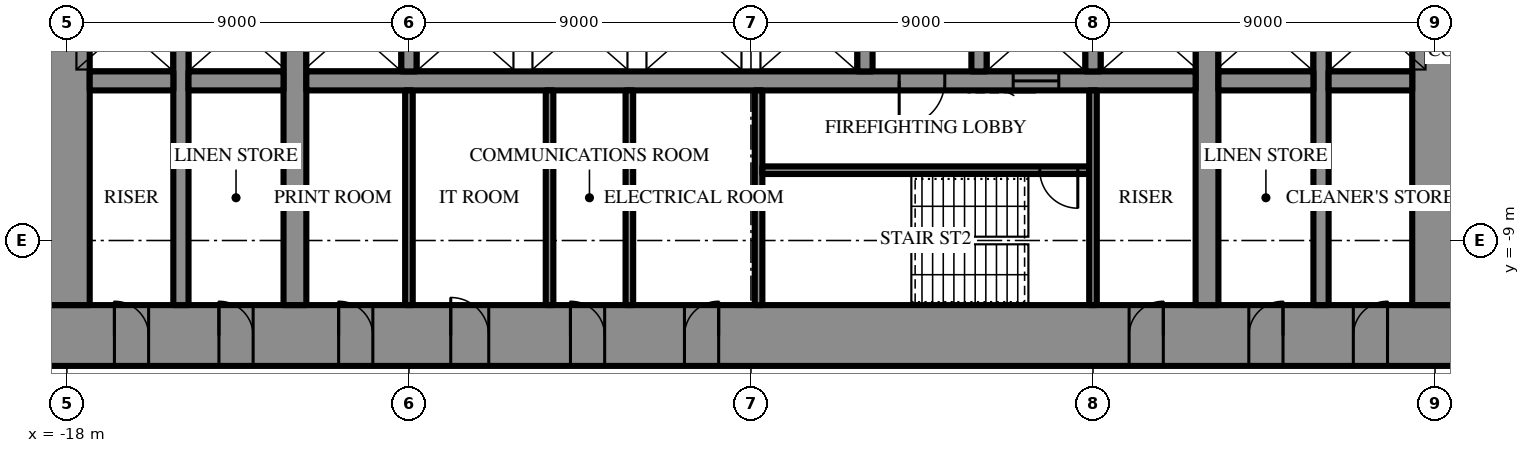
"""IFC4 building model, lengths in metres.
Left out: names, types, materials, properties, quantities, classifications, styles, units other than length and angle.
Written with IfcOpenShell. Run it as: python <this file> out.ifc"""

import sys

from ifc_helpers import new_model, si_unit, direction, frame, frame_2d, origin, place, context, subcontext, project, spatial, rectangle, extrude, element, fill, save


model = new_model("IFC4")
c1 = context("Model", 3, precision=1e-05, world=origin(), true_north=direction((0.0, 1.0)))
c2 = subcontext(c1, "Body", "Model", "MODEL_VIEW")
j1 = project(units=[si_unit("LENGTHUNIT", "METRE"), si_unit("PLANEANGLEUNIT", "RADIAN")], contexts=[c1])
p1 = place(None, origin())
s1 = spatial("IfcSite", under=j1, at=p1, CompositionType="ELEMENT")
p2 = place(p1, origin())
s2 = spatial("IfcBuilding", under=s1, at=p2, CompositionType="ELEMENT")
p3 = place(p2, frame((0.0, 0.0, 90.7)))
s3 = spatial("IfcBuildingStorey", under=s2, at=p3, CompositionType="ELEMENT", Elevation=90.7)
p4 = place(p3, frame((18.6, -11.5, 0.0), z_axis=(0.0, 0.0, 1.0), x_axis=(-1.0, 0.0, 0.0)))
e1 = element("IfcWall", 1, at=p4, inside=s3, PredefinedType="SHEAR", context=c2, shape_type="SweptSolid", body=[
    extrude(rectangle(XDim=37.2, YDim=1.6, at=frame_2d((18.6, 0.0))), origin(), (0.0, 0.0, 1.0), 4.2),
])
p5 = place(p4, frame((19.45, 0.0, 0.0)))
e2 = element("IfcOpeningElement", 2, at=p5, cuts=e1, PredefinedType="OPENING", context=c2, shape_type="SweptSolid", body=[
    extrude(rectangle(XDim=0.9, YDim=2.2, at=frame_2d((0.45, 1.1))), frame((0.0, 0.81, 0.0), z_axis=(0.0, -1.0, 0.0), x_axis=(1.0, 0.0, 0.0)), (0.0, 0.0, 1.0), 1.62),
])
p6 = place(p4, frame((22.45, 0.0, 0.0)))
e3 = element("IfcOpeningElement", 3, at=p6, cuts=e1, PredefinedType="OPENING", context=c2, shape_type="SweptSolid", body=[
    extrude(rectangle(XDim=0.9, YDim=2.2, at=frame_2d((0.45, 1.1))), frame((0.0, 0.81, 0.0), z_axis=(0.0, -1.0, 0.0), x_axis=(1.0, 0.0, 0.0)), (0.0, 0.0, 1.0), 1.62),
])
p7 = place(p4, frame((25.5, 0.0, 0.0)))
e4 = element("IfcOpeningElement", 4, at=p7, cuts=e1, PredefinedType="OPENING", context=c2, shape_type="SweptSolid", body=[
    extrude(rectangle(XDim=1.0, YDim=2.2, at=frame_2d((0.5, 1.1))), frame((0.0, 0.81, 0.0), z_axis=(0.0, -1.0, 0.0), x_axis=(1.0, 0.0, 0.0)), (0.0, 0.0, 1.0), 1.62),
])
p8 = place(p4, frame((1.85, 0.0, 0.0)))
e5 = element("IfcOpeningElement", 5, at=p8, cuts=e1, PredefinedType="OPENING", context=c2, shape_type="SweptSolid", body=[
    extrude(rectangle(XDim=0.9, YDim=2.2, at=frame_2d((0.45, 1.1))), frame((0.0, 0.81, 0.0), z_axis=(0.0, -1.0, 0.0), x_axis=(1.0, 0.0, 0.0)), (0.0, 0.0, 1.0), 1.62),
])
p9 = place(p4, frame((4.6, 0.0, 0.0)))
e6 = element("IfcOpeningElement", 6, at=p9, cuts=e1, PredefinedType="OPENING", context=c2, shape_type="SweptSolid", body=[
    extrude(rectangle(XDim=0.9, YDim=2.2, at=frame_2d((0.45, 1.1))), frame((0.0, 0.81, 0.0), z_axis=(0.0, -1.0, 0.0), x_axis=(1.0, 0.0, 0.0)), (0.0, 0.0, 1.0), 1.62),
])
p10 = place(p4, frame((7.75, 0.0, 0.0)))
e7 = element("IfcOpeningElement", 7, at=p10, cuts=e1, PredefinedType="OPENING", context=c2, shape_type="SweptSolid", body=[
    extrude(rectangle(XDim=0.9, YDim=2.2, at=frame_2d((0.45, 1.1))), frame((0.0, 0.81, 0.0), z_axis=(0.0, -1.0, 0.0), x_axis=(1.0, 0.0, 0.0)), (0.0, 0.0, 1.0), 1.62),
])
p11 = place(p4, frame((28.55, 0.0, 0.0)))
e8 = element("IfcOpeningElement", 8, at=p11, cuts=e1, PredefinedType="OPENING", context=c2, shape_type="SweptSolid", body=[
    extrude(rectangle(XDim=0.9, YDim=2.2, at=frame_2d((0.45, 1.1))), frame((0.0, 0.81, 0.0), z_axis=(0.0, -1.0, 0.0), x_axis=(1.0, 0.0, 0.0)), (0.0, 0.0, 1.0), 1.62),
])
p12 = place(p4, frame((31.7, 0.0, 0.0)))
e9 = element("IfcOpeningElement", 9, at=p12, cuts=e1, PredefinedType="OPENING", context=c2, shape_type="SweptSolid", body=[
    extrude(rectangle(XDim=0.9, YDim=2.2, at=frame_2d((0.45, 1.1))), frame((0.0, 0.81, 0.0), z_axis=(0.0, -1.0, 0.0), x_axis=(1.0, 0.0, 0.0)), (0.0, 0.0, 1.0), 1.62),
])
p13 = place(p4, frame((34.45, 0.0, 0.0)))
e10 = element("IfcOpeningElement", 10, at=p13, cuts=e1, PredefinedType="OPENING", context=c2, shape_type="SweptSolid", body=[
    extrude(rectangle(XDim=0.9, YDim=2.2, at=frame_2d((0.45, 1.1))), frame((0.0, 0.81, 0.0), z_axis=(0.0, -1.0, 0.0), x_axis=(1.0, 0.0, 0.0)), (0.0, 0.0, 1.0), 1.62),
])
p14 = place(p3, frame((18.0, -10.7, 0.0), z_axis=(0.0, 0.0, 1.0), x_axis=(0.0, 1.0, 0.0)))
e11 = element("IfcWall", 11, at=p14, inside=s3, PredefinedType="SHEAR", context=c2, shape_type="SweptSolid", body=[
    extrude(rectangle(XDim=21.4, YDim=1.2, at=frame_2d((10.7, 0.0))), origin(), (0.0, 0.0, 1.0), 4.2),
])
p15 = place(p14, frame((9.8, 0.0, 0.0)))
e12 = element("IfcOpeningElement", 12, at=p15, cuts=e11, PredefinedType="OPENING", context=c2, shape_type="SweptSolid", body=[
    extrude(rectangle(XDim=1.8, YDim=2.4, at=frame_2d((0.9, 1.2))), frame((0.0, 0.61, 0.0), z_axis=(0.0, -1.0, 0.0), x_axis=(1.0, 0.0, 0.0)), (0.0, 0.0, 1.0), 1.22),
])
p16 = place(p3, frame((-18.0, 10.7, 0.0), z_axis=(0.0, 0.0, 1.0), x_axis=(0.0, -1.0, 0.0)))
e13 = element("IfcWall", 13, at=p16, inside=s3, PredefinedType="SHEAR", context=c2, shape_type="SweptSolid", body=[
    extrude(rectangle(XDim=21.4, YDim=1.2, at=frame_2d((10.7, 0.0))), origin(), (0.0, 0.0, 1.0), 4.2),
])
p17 = place(p16, frame((9.8, 0.0, 0.0)))
e14 = element("IfcOpeningElement", 14, at=p17, cuts=e13, PredefinedType="OPENING", context=c2, shape_type="SweptSolid", body=[
    extrude(rectangle(XDim=1.8, YDim=2.4, at=frame_2d((0.9, 1.2))), frame((0.0, 0.61, 0.0), z_axis=(0.0, -1.0, 0.0), x_axis=(1.0, 0.0, 0.0)), (0.0, 0.0, 1.0), 1.22),
])
p18 = place(p3, frame((12.0, -10.7, 0.0), z_axis=(0.0, 0.0, 1.0), x_axis=(0.0, 1.0, 0.0)))
e15 = element("IfcWall", 15, at=p18, inside=s3, PredefinedType="SHEAR", context=c2, shape_type="SweptSolid", body=[
    extrude(rectangle(XDim=21.4, YDim=0.6, at=frame_2d((10.7, 0.0))), origin(), (0.0, 0.0, 1.0), 4.2),
])
p19 = place(p18, frame((9.8, 0.0, 0.0)))
e16 = element("IfcOpeningElement", 16, at=p19, cuts=e15, PredefinedType="OPENING", context=c2, shape_type="SweptSolid", body=[
    extrude(rectangle(XDim=1.8, YDim=2.4, at=frame_2d((0.9, 1.2))), frame((0.0, 0.31, 0.0), z_axis=(0.0, -1.0, 0.0), x_axis=(1.0, 0.0, 0.0)), (0.0, 0.0, 1.0), 0.62),
])
p20 = place(p3, frame((-12.0, -10.7, 0.0), z_axis=(0.0, 0.0, 1.0), x_axis=(0.0, 1.0, 0.0)))
e17 = element("IfcWall", 17, at=p20, inside=s3, PredefinedType="SHEAR", context=c2, shape_type="SweptSolid", body=[
    extrude(rectangle(XDim=21.4, YDim=0.6, at=frame_2d((10.7, 0.0))), origin(), (0.0, 0.0, 1.0), 4.2),
])
p21 = place(p20, frame((9.8, 0.0, 0.0)))
e18 = element("IfcOpeningElement", 18, at=p21, cuts=e17, PredefinedType="OPENING", context=c2, shape_type="SweptSolid", body=[
    extrude(rectangle(XDim=1.8, YDim=2.4, at=frame_2d((0.9, 1.2))), frame((0.0, 0.31, 0.0), z_axis=(0.0, -1.0, 0.0), x_axis=(1.0, 0.0, 0.0)), (0.0, 0.0, 1.0), 0.62),
])
p22 = place(p3, frame((15.0, -10.7, 0.0), z_axis=(0.0, 0.0, 1.0), x_axis=(0.0, 1.0, 0.0)))
e19 = element("IfcWall", 19, at=p22, inside=s3, PredefinedType="SHEAR", context=c2, shape_type="SweptSolid", body=[
    extrude(rectangle(XDim=21.4, YDim=0.4, at=frame_2d((10.7, 0.0))), origin(), (0.0, 0.0, 1.0), 4.2),
])
p23 = place(p22, frame((9.8, 0.0, 0.0)))
e20 = element("IfcOpeningElement", 20, at=p23, cuts=e19, PredefinedType="OPENING", context=c2, shape_type="SweptSolid", body=[
    extrude(rectangle(XDim=1.8, YDim=2.4, at=frame_2d((0.9, 1.2))), frame((0.0, 0.21, 0.0), z_axis=(0.0, -1.0, 0.0), x_axis=(1.0, 0.0, 0.0)), (0.0, 0.0, 1.0), 0.42),
])
p24 = place(p3, frame((-15.0, -10.7, 0.0), z_axis=(0.0, 0.0, 1.0), x_axis=(0.0, 1.0, 0.0)))
e21 = element("IfcWall", 21, at=p24, inside=s3, PredefinedType="SHEAR", context=c2, shape_type="SweptSolid", body=[
    extrude(rectangle(XDim=21.4, YDim=0.4, at=frame_2d((10.7, 0.0))), origin(), (0.0, 0.0, 1.0), 4.2),
])
p25 = place(p24, frame((9.8, 0.0, 0.0)))
e22 = element("IfcOpeningElement", 22, at=p25, cuts=e21, PredefinedType="OPENING", context=c2, shape_type="SweptSolid", body=[
    extrude(rectangle(XDim=1.8, YDim=2.4, at=frame_2d((0.9, 1.2))), frame((0.0, 0.21, 0.0), z_axis=(0.0, -1.0, 0.0), x_axis=(1.0, 0.0, 0.0)), (0.0, 0.0, 1.0), 0.42),
])
p26 = place(p3, frame((17.4, -4.8, 0.0), z_axis=(0.0, 0.0, 1.0), x_axis=(-1.0, 0.0, 0.0)))
e23 = element("IfcWall", 23, at=p26, inside=s3, PredefinedType="SHEAR", context=c2, shape_type="SweptSolid", body=[
    extrude(rectangle(XDim=2.2, YDim=0.5, at=frame_2d((1.1, 0.0))), origin(), (0.0, 0.0, 1.0), 4.2),
])
p27 = place(p3, frame((14.8, -4.8, 0.0), z_axis=(0.0, 0.0, 1.0), x_axis=(-1.0, 0.0, 0.0)))
e24 = element("IfcWall", 24, at=p27, inside=s3, PredefinedType="SHEAR", context=c2, shape_type="SweptSolid", body=[
    extrude(rectangle(XDim=2.5, YDim=0.5, at=frame_2d((1.25, 0.0))), origin(), (0.0, 0.0, 1.0), 4.2),
])
p28 = place(p3, frame((11.7, -4.8, 0.0), z_axis=(0.0, 0.0, 1.0), x_axis=(-1.0, 0.0, 0.0)))
e25 = element("IfcWall", 25, at=p28, inside=s3, PredefinedType="SHEAR", context=c2, shape_type="SweptSolid", body=[
    extrude(rectangle(XDim=23.4, YDim=0.5, at=frame_2d((11.7, 0.0))), origin(), (0.0, 0.0, 1.0), 4.2),
])
p29 = place(p28, frame((6.6, 0.0, 0.0)))
e26 = element("IfcOpeningElement", 26, at=p29, cuts=e25, PredefinedType="OPENING", context=c2, shape_type="SweptSolid", body=[
    extrude(rectangle(XDim=1.2, YDim=2.2, at=frame_2d((0.6, 1.1))), frame((0.0, 0.26, 0.0), z_axis=(0.0, -1.0, 0.0), x_axis=(1.0, 0.0, 0.0)), (0.0, 0.0, 1.0), 0.52),
])
p30 = place(p28, frame((3.6, 0.0, 0.0)))
e27 = element("IfcOpeningElement", 27, at=p30, cuts=e25, PredefinedType="OPENING", context=c2, shape_type="SweptSolid", body=[
    extrude(rectangle(XDim=1.2, YDim=2.2, at=frame_2d((0.6, 1.1))), frame((0.0, 0.26, 0.0), z_axis=(0.0, -1.0, 0.0), x_axis=(1.0, 0.0, 0.0)), (0.0, 0.0, 1.0), 0.52),
])
p31 = place(p3, frame((-12.3, -4.8, 0.0), z_axis=(0.0, 0.0, 1.0), x_axis=(-1.0, 0.0, 0.0)))
e28 = element("IfcWall", 28, at=p31, inside=s3, PredefinedType="SHEAR", context=c2, shape_type="SweptSolid", body=[
    extrude(rectangle(XDim=2.5, YDim=0.5, at=frame_2d((1.25, 0.0))), origin(), (0.0, 0.0, 1.0), 4.2),
])
p32 = place(p3, frame((-15.2, -4.8, 0.0), z_axis=(0.0, 0.0, 1.0), x_axis=(-1.0, 0.0, 0.0)))
e29 = element("IfcWall", 29, at=p32, inside=s3, PredefinedType="SHEAR", context=c2, shape_type="SweptSolid", body=[
    extrude(rectangle(XDim=2.2, YDim=0.5, at=frame_2d((1.1, 0.0))), origin(), (0.0, 0.0, 1.0), 4.2),
])
for number, where, z_axis, x_axis in (
    (30, (9.0, -2.25, 0.0), (0.0, 0.0, 1.0), (0.0, -1.0, 0.0)),
    (31, (6.0, -2.25, 0.0), (0.0, 0.0, 1.0), (0.0, -1.0, 0.0)),
    (32, (3.0, -2.25, 0.0), (0.0, 0.0, 1.0), (0.0, -1.0, 0.0)),
    (33, (-9.0, -2.25, 0.0), (0.0, 0.0, 1.0), (0.0, -1.0, 0.0)),
):
    element("IfcWall", number, at=place(p3, frame(where, z_axis=z_axis, x_axis=x_axis)), inside=s3, PredefinedType="SHEAR", context=c2, shape_type="SweptSolid", body=[
        extrude(rectangle(XDim=2.3, YDim=0.4, at=frame_2d((1.15, 0.0))), origin(), (0.0, 0.0, 1.0), 4.2),
    ])
p33 = place(p3, frame((0.2, -5.05, 0.0), z_axis=(0.0, 0.0, 1.0), x_axis=(0.0, -1.0, 0.0)))
e34 = element("IfcWall", 34, at=p33, inside=s3, PredefinedType="SHEAR", context=c2, shape_type="SweptSolid", body=[
    extrude(rectangle(XDim=5.65, YDim=0.2, at=frame_2d((2.825, 0.0))), origin(), (0.0, 0.0, 1.0), 4.2),
])
p34 = place(p3, frame((8.9, -7.15, 0.0), z_axis=(0.0, 0.0, 1.0), x_axis=(-1.0, 0.0, 0.0)))
e35 = element("IfcWall", 35, at=p34, inside=s3, PredefinedType="SHEAR", context=c2, shape_type="SweptSolid", body=[
    extrude(rectangle(XDim=8.6, YDim=0.2, at=frame_2d((4.3, 0.0))), origin(), (0.0, 0.0, 1.0), 4.2),
])
p35 = place(p34, frame((0.3, 0.0, 0.0)))
e36 = element("IfcOpeningElement", 36, at=p35, cuts=e35, PredefinedType="OPENING", context=c2, shape_type="SweptSolid", body=[
    extrude(rectangle(XDim=1.0, YDim=2.2, at=frame_2d((0.5, 1.1))), frame((0.0, 0.11, 0.0), z_axis=(0.0, -1.0, 0.0), x_axis=(1.0, 0.0, 0.0)), (0.0, 0.0, 1.0), 0.22),
])
for number, where, z_axis, x_axis in (
    (37, (9.0, -5.05, 0.0), (0.0, 0.0, 1.0), (0.0, -1.0, 0.0)),
    (38, (-9.0, -5.05, 0.0), (0.0, 0.0, 1.0), (0.0, -1.0, 0.0)),
    (39, (-3.2, -5.05, 0.0), (0.0, 0.0, 1.0), (0.0, -1.0, 0.0)),
    (40, (-5.3, -5.05, 0.0), (0.0, 0.0, 1.0), (0.0, -1.0, 0.0)),
):
    element("IfcWall", number, at=place(p3, frame(where, z_axis=z_axis, x_axis=x_axis)), inside=s3, PredefinedType="PARTITIONING", context=c2, shape_type="SweptSolid", body=[
        extrude(rectangle(XDim=5.65, YDim=0.2, at=frame_2d((2.825, 0.0))), origin(), (0.0, 0.0, 1.0), 4.0),
    ])
p36 = place(p29, origin())
e41 = element("IfcDoor", 41, at=p36, inside=s3, OperationType="SINGLE_SWING_LEFT", PredefinedType="DOOR", context=c2, shape_type="SweptSolid", body=[
    extrude(rectangle(XDim=1.2, YDim=2.2, at=frame_2d((0.6, 1.1))), frame((0.0, 0.025, 0.0), z_axis=(0.0, -1.0, 0.0), x_axis=(1.0, 0.0, 0.0)), (0.0, 0.0, 1.0), 0.05),
])
fill(e26, e41)
p37 = place(p35, origin())
e42 = element("IfcDoor", 42, at=p37, inside=s3, OperationType="SINGLE_SWING_RIGHT", PredefinedType="DOOR", context=c2, shape_type="SweptSolid", body=[
    extrude(rectangle(XDim=1.0, YDim=2.2, at=frame_2d((0.5, 1.1))), frame((0.0, 0.025, 0.0), z_axis=(0.0, -1.0, 0.0), x_axis=(1.0, 0.0, 0.0)), (0.0, 0.0, 1.0), 0.05),
])
fill(e36, e42)
p38 = place(p5, frame((0.9, 0.0, 0.0), z_axis=(0.0, 0.0, 1.0), x_axis=(-1.0, 0.0, 0.0)))
e43 = element("IfcDoor", 43, at=p38, inside=s3, OperationType="SINGLE_SWING_LEFT", PredefinedType="DOOR", context=c2, shape_type="SweptSolid", body=[
    extrude(rectangle(XDim=0.9, YDim=2.2, at=frame_2d((0.45, 1.1))), frame((0.0, 0.025, 0.0), z_axis=(0.0, -1.0, 0.0), x_axis=(1.0, 0.0, 0.0)), (0.0, 0.0, 1.0), 0.05),
])
fill(e2, e43)
p39 = place(p6, frame((0.9, 0.0, 0.0), z_axis=(0.0, 0.0, 1.0), x_axis=(-1.0, 0.0, 0.0)))
e44 = element("IfcDoor", 44, at=p39, inside=s3, OperationType="SINGLE_SWING_RIGHT", PredefinedType="DOOR", context=c2, shape_type="SweptSolid", body=[
    extrude(rectangle(XDim=0.9, YDim=2.2, at=frame_2d((0.45, 1.1))), frame((0.0, 0.025, 0.0), z_axis=(0.0, -1.0, 0.0), x_axis=(1.0, 0.0, 0.0)), (0.0, 0.0, 1.0), 0.05),
])
fill(e3, e44)
p40 = place(p7, frame((1.0, 0.0, 0.0), z_axis=(0.0, 0.0, 1.0), x_axis=(-1.0, 0.0, 0.0)))
e45 = element("IfcDoor", 45, at=p40, inside=s3, OperationType="SINGLE_SWING_RIGHT", PredefinedType="DOOR", context=c2, shape_type="SweptSolid", body=[
    extrude(rectangle(XDim=1.0, YDim=2.2, at=frame_2d((0.5, 1.1))), frame((0.0, 0.025, 0.0), z_axis=(0.0, -1.0, 0.0), x_axis=(1.0, 0.0, 0.0)), (0.0, 0.0, 1.0), 0.05),
])
fill(e4, e45)
p41 = place(p8, frame((0.9, 0.0, 0.0), z_axis=(0.0, 0.0, 1.0), x_axis=(-1.0, 0.0, 0.0)))
e46 = element("IfcDoor", 46, at=p41, inside=s3, OperationType="SINGLE_SWING_LEFT", PredefinedType="DOOR", context=c2, shape_type="SweptSolid", body=[
    extrude(rectangle(XDim=0.9, YDim=2.2, at=frame_2d((0.45, 1.1))), frame((0.0, 0.025, 0.0), z_axis=(0.0, -1.0, 0.0), x_axis=(1.0, 0.0, 0.0)), (0.0, 0.0, 1.0), 0.05),
])
fill(e5, e46)
p42 = place(p9, frame((0.9, 0.0, 0.0), z_axis=(0.0, 0.0, 1.0), x_axis=(-1.0, 0.0, 0.0)))
e47 = element("IfcDoor", 47, at=p42, inside=s3, OperationType="SINGLE_SWING_LEFT", PredefinedType="DOOR", context=c2, shape_type="SweptSolid", body=[
    extrude(rectangle(XDim=0.9, YDim=2.2, at=frame_2d((0.45, 1.1))), frame((0.0, 0.025, 0.0), z_axis=(0.0, -1.0, 0.0), x_axis=(1.0, 0.0, 0.0)), (0.0, 0.0, 1.0), 0.05),
])
fill(e6, e47)
p43 = place(p10, frame((0.9, 0.0, 0.0), z_axis=(0.0, 0.0, 1.0), x_axis=(-1.0, 0.0, 0.0)))
e48 = element("IfcDoor", 48, at=p43, inside=s3, OperationType="SINGLE_SWING_LEFT", PredefinedType="DOOR", context=c2, shape_type="SweptSolid", body=[
    extrude(rectangle(XDim=0.9, YDim=2.2, at=frame_2d((0.45, 1.1))), frame((0.0, 0.025, 0.0), z_axis=(0.0, -1.0, 0.0), x_axis=(1.0, 0.0, 0.0)), (0.0, 0.0, 1.0), 0.05),
])
fill(e7, e48)
p44 = place(p11, frame((0.9, 0.0, 0.0), z_axis=(0.0, 0.0, 1.0), x_axis=(-1.0, 0.0, 0.0)))
e49 = element("IfcDoor", 49, at=p44, inside=s3, OperationType="SINGLE_SWING_RIGHT", PredefinedType="DOOR", context=c2, shape_type="SweptSolid", body=[
    extrude(rectangle(XDim=0.9, YDim=2.2, at=frame_2d((0.45, 1.1))), frame((0.0, 0.025, 0.0), z_axis=(0.0, -1.0, 0.0), x_axis=(1.0, 0.0, 0.0)), (0.0, 0.0, 1.0), 0.05),
])
fill(e8, e49)
p45 = place(p12, frame((0.9, 0.0, 0.0), z_axis=(0.0, 0.0, 1.0), x_axis=(-1.0, 0.0, 0.0)))
e50 = element("IfcDoor", 50, at=p45, inside=s3, OperationType="SINGLE_SWING_RIGHT", PredefinedType="DOOR", context=c2, shape_type="SweptSolid", body=[
    extrude(rectangle(XDim=0.9, YDim=2.2, at=frame_2d((0.45, 1.1))), frame((0.0, 0.025, 0.0), z_axis=(0.0, -1.0, 0.0), x_axis=(1.0, 0.0, 0.0)), (0.0, 0.0, 1.0), 0.05),
])
fill(e9, e50)
p46 = place(p13, frame((0.9, 0.0, 0.0), z_axis=(0.0, 0.0, 1.0), x_axis=(-1.0, 0.0, 0.0)))
e51 = element("IfcDoor", 51, at=p46, inside=s3, OperationType="SINGLE_SWING_RIGHT", PredefinedType="DOOR", context=c2, shape_type="SweptSolid", body=[
    extrude(rectangle(XDim=0.9, YDim=2.2, at=frame_2d((0.45, 1.1))), frame((0.0, 0.025, 0.0), z_axis=(0.0, -1.0, 0.0), x_axis=(1.0, 0.0, 0.0)), (0.0, 0.0, 1.0), 0.05),
])
fill(e10, e51)
p47 = place(p30, origin())
e52 = element("IfcDoor", 52, at=p47, inside=s3, OperationType="SLIDING_TO_LEFT", PredefinedType="DOOR", context=c2, shape_type="SweptSolid", body=[
    extrude(rectangle(XDim=1.2, YDim=2.2, at=frame_2d((0.6, 1.1))), frame((0.0, 0.025, 0.0), z_axis=(0.0, -1.0, 0.0), x_axis=(1.0, 0.0, 0.0)), (0.0, 0.0, 1.0), 0.05),
])
fill(e27, e52)
save(model, sys.argv[1])
